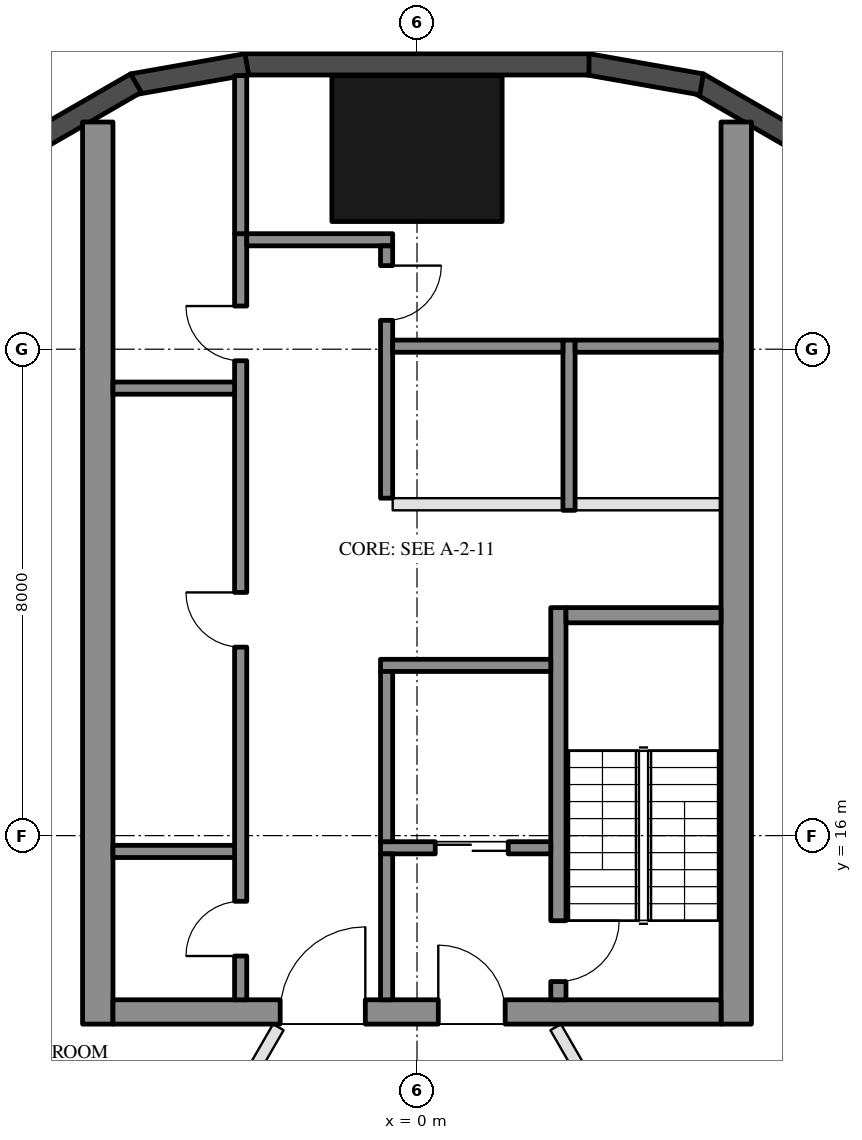
"""IFC4 building model, lengths in metres.
Left out: names, types, materials, properties, quantities, classifications, styles, units other than length and angle.
Written with IfcOpenShell. Run it as: python <this file> out.ifc"""

import sys

from ifc_helpers import new_model, si_unit, direction, frame, frame_2d, origin, origin_2d, place, context, subcontext, project, spatial, rectangle, hollow_rectangle, extrude, element, fill, save


model = new_model("IFC4")
c1 = context("Model", 3, precision=1e-05, world=origin(), true_north=direction((0.0, 1.0)))
c2 = subcontext(c1, "Body", "Model", "MODEL_VIEW")
j1 = project(units=[si_unit("LENGTHUNIT", "METRE"), si_unit("PLANEANGLEUNIT", "RADIAN")], contexts=[c1])
p1 = place(None, origin())
s1 = spatial("IfcSite", under=j1, at=p1, CompositionType="ELEMENT")
p2 = place(p1, origin())
s2 = spatial("IfcBuilding", under=s1, at=p2, CompositionType="ELEMENT")
p3 = place(p2, frame((0.0, 0.0, 53.9)))
s3 = spatial("IfcBuildingStorey", under=s2, at=p3, CompositionType="ELEMENT", Elevation=53.9)
p4 = place(p3, frame((0.0, 27.3, 0.0), z_axis=(0.0, 0.0, 1.0), x_axis=(1.0, 0.0, 0.0)))
e1 = element("IfcColumn", 1, at=p4, inside=s3, PredefinedType="COLUMN", context=c2, shape_type="SweptSolid", body=[
    extrude(hollow_rectangle(XDim=2.8, YDim=2.4, WallThickness=0.07, at=origin_2d()), origin(), (0.0, 0.0, 1.0), 3.7),
])
for number, where, z_axis, x_axis in (
    (2, (6.277, 27.422, 0.0), (0.0, 0.0, 1.0), (-0.866, 0.5, 0.0)),
    (3, (4.68, 28.356, 0.0), (0.0, 0.0, 1.0), (-0.985, 0.174, 0.0)),
):
    element("IfcWall", number, at=place(p3, frame(where, z_axis=z_axis, x_axis=x_axis)), inside=s3, PredefinedType="SOLIDWALL", context=c2, shape_type="SweptSolid", body=[
        extrude(rectangle(XDim=1.91, YDim=0.35, at=frame_2d((0.955, 0.0))), origin(), (0.0, 0.0, 1.0), 3.55),
    ])
p5 = place(p3, frame((2.829, 28.685, 0.0), z_axis=(0.0, 0.0, 1.0), x_axis=(-1.0, 0.0, 0.0)))
e4 = element("IfcWall", 4, at=p5, inside=s3, PredefinedType="SOLIDWALL", context=c2, shape_type="SweptSolid", body=[
    extrude(rectangle(XDim=5.658, YDim=0.35, at=frame_2d((2.829, 0.0))), origin(), (0.0, 0.0, 1.0), 3.55),
])
for number, where, z_axis, x_axis in (
    (5, (-2.799, 28.688, 0.0), (0.0, 0.0, 1.0), (-0.985, -0.174, 0.0)),
    (6, (-4.623, 28.377, 0.0), (0.0, 0.0, 1.0), (-0.866, -0.5, 0.0)),
):
    element("IfcWall", number, at=place(p3, frame(where, z_axis=z_axis, x_axis=x_axis)), inside=s3, PredefinedType="SOLIDWALL", context=c2, shape_type="SweptSolid", body=[
        extrude(rectangle(XDim=1.91, YDim=0.35, at=frame_2d((0.955, 0.0))), origin(), (0.0, 0.0, 1.0), 3.55),
    ])
for number, where, z_axis, x_axis in (
    (7, (5.25, 12.9, 0.0), (0.0, 0.0, 1.0), (0.0, 1.0, 0.0)),
    (8, (-5.25, 12.9, 0.0), (0.0, 0.0, 1.0), (0.0, 1.0, 0.0)),
):
    element("IfcWall", number, at=place(p3, frame(where, z_axis=z_axis, x_axis=x_axis)), inside=s3, PredefinedType="SHEAR", context=c2, shape_type="SweptSolid", body=[
        extrude(rectangle(XDim=14.837, YDim=0.5, at=frame_2d((7.418, 0.0))), origin(), (0.0, 0.0, 1.0), 3.5),
    ])
p6 = place(p3, frame((5.0, 13.1, 0.0), z_axis=(0.0, 0.0, 1.0), x_axis=(-1.0, 0.0, 0.0)))
e9 = element("IfcWall", 9, at=p6, inside=s3, PredefinedType="SHEAR", context=c2, shape_type="SweptSolid", body=[
    extrude(rectangle(XDim=10.0, YDim=0.4, at=frame_2d((5.0, 0.0))), origin(), (0.0, 0.0, 1.0), 3.5),
])
p7 = place(p6, frame((3.55, 0.0, 0.0)))
e10 = element("IfcOpeningElement", 10, at=p7, cuts=e9, PredefinedType="OPENING", context=c2, shape_type="SweptSolid", body=[
    extrude(rectangle(XDim=1.1, YDim=2.1, at=frame_2d((0.55, 1.05))), frame((0.0, 0.21, 0.0), z_axis=(0.0, -1.0, 0.0), x_axis=(1.0, 0.0, 0.0)), (0.0, 0.0, 1.0), 0.42),
])
p8 = place(p6, frame((5.85, 0.0, 0.0)))
e11 = element("IfcOpeningElement", 11, at=p8, cuts=e9, PredefinedType="OPENING", context=c2, shape_type="SweptSolid", body=[
    extrude(rectangle(XDim=1.4, YDim=2.1, at=frame_2d((0.7, 1.05))), frame((0.0, 0.21, 0.0), z_axis=(0.0, -1.0, 0.0), x_axis=(1.0, 0.0, 0.0)), (0.0, 0.0, 1.0), 0.42),
])
p9 = place(p3, frame((2.325, 13.3, 0.0), z_axis=(0.0, 0.0, 1.0), x_axis=(0.0, 1.0, 0.0)))
e12 = element("IfcWall", 12, at=p9, inside=s3, PredefinedType="SHEAR", context=c2, shape_type="SweptSolid", body=[
    extrude(rectangle(XDim=6.45, YDim=0.25, at=frame_2d((3.225, 0.0))), origin(), (0.0, 0.0, 1.0), 3.5),
])
p10 = place(p9, frame((0.3, 0.0, 0.0)))
e13 = element("IfcOpeningElement", 13, at=p10, cuts=e12, PredefinedType="OPENING", context=c2, shape_type="SweptSolid", body=[
    extrude(rectangle(XDim=1.0, YDim=2.1, at=frame_2d((0.5, 1.05))), frame((0.0, 0.135, 0.0), z_axis=(0.0, -1.0, 0.0), x_axis=(1.0, 0.0, 0.0)), (0.0, 0.0, 1.0), 0.27),
])
p11 = place(p3, frame((5.0, 19.625, 0.0), z_axis=(0.0, 0.0, 1.0), x_axis=(-1.0, 0.0, 0.0)))
e14 = element("IfcWall", 14, at=p11, inside=s3, PredefinedType="SHEAR", context=c2, shape_type="SweptSolid", body=[
    extrude(rectangle(XDim=2.55, YDim=0.25, at=frame_2d((1.275, 0.0))), origin(), (0.0, 0.0, 1.0), 3.5),
])
p12 = place(p3, frame((2.2, 18.8, 0.0), z_axis=(0.0, 0.0, 1.0), x_axis=(-1.0, 0.0, 0.0)))
e15 = element("IfcWall", 15, at=p12, inside=s3, PredefinedType="SHEAR", context=c2, shape_type="SweptSolid", body=[
    extrude(rectangle(XDim=2.8, YDim=0.2, at=frame_2d((1.4, 0.0))), origin(), (0.0, 0.0, 1.0), 3.5),
])
p13 = place(p3, frame((2.2, 15.8, 0.0), z_axis=(0.0, 0.0, 1.0), x_axis=(-1.0, 0.0, 0.0)))
e16 = element("IfcWall", 16, at=p13, inside=s3, PredefinedType="SHEAR", context=c2, shape_type="SweptSolid", body=[
    extrude(rectangle(XDim=2.8, YDim=0.2, at=frame_2d((1.4, 0.0))), origin(), (0.0, 0.0, 1.0), 3.5),
])
p14 = place(p13, frame((0.7, 0.0, 0.0)))
e17 = element("IfcOpeningElement", 17, at=p14, cuts=e16, PredefinedType="OPENING", context=c2, shape_type="SweptSolid", body=[
    extrude(rectangle(XDim=1.2, YDim=2.1, at=frame_2d((0.6, 1.05))), frame((0.0, 0.11, 0.0), z_axis=(0.0, -1.0, 0.0), x_axis=(1.0, 0.0, 0.0)), (0.0, 0.0, 1.0), 0.22),
])
p15 = place(p3, frame((-0.5, 15.9, 0.0), z_axis=(0.0, 0.0, 1.0), x_axis=(0.0, 1.0, 0.0)))
e18 = element("IfcWall", 18, at=p15, inside=s3, PredefinedType="SHEAR", context=c2, shape_type="SweptSolid", body=[
    extrude(rectangle(XDim=2.8, YDim=0.2, at=frame_2d((1.4, 0.0))), origin(), (0.0, 0.0, 1.0), 3.5),
])
p16 = place(p3, frame((-0.5, 13.3, 0.0), z_axis=(0.0, 0.0, 1.0), x_axis=(0.0, 1.0, 0.0)))
e19 = element("IfcWall", 19, at=p16, inside=s3, PredefinedType="SHEAR", context=c2, shape_type="SweptSolid", body=[
    extrude(rectangle(XDim=2.4, YDim=0.2, at=frame_2d((1.2, 0.0))), origin(), (0.0, 0.0, 1.0), 3.5),
])
p17 = place(p3, frame((-2.9, 13.3, 0.0), z_axis=(0.0, 0.0, 1.0), x_axis=(0.0, 1.0, 0.0)))
e20 = element("IfcWall", 20, at=p17, inside=s3, PredefinedType="SHEAR", context=c2, shape_type="SweptSolid", body=[
    extrude(rectangle(XDim=12.6, YDim=0.2, at=frame_2d((6.3, 0.0))), origin(), (0.0, 0.0, 1.0), 3.5),
])
p18 = place(p17, frame((0.72, 0.0, 0.0)))
e21 = element("IfcOpeningElement", 21, at=p18, cuts=e20, PredefinedType="OPENING", context=c2, shape_type="SweptSolid", body=[
    extrude(rectangle(XDim=0.9, YDim=2.1, at=frame_2d((0.45, 1.05))), frame((0.0, 0.11, 0.0), z_axis=(0.0, -1.0, 0.0), x_axis=(1.0, 0.0, 0.0)), (0.0, 0.0, 1.0), 0.22),
])
p19 = place(p17, frame((5.8, 0.0, 0.0)))
e22 = element("IfcOpeningElement", 22, at=p19, cuts=e20, PredefinedType="OPENING", context=c2, shape_type="SweptSolid", body=[
    extrude(rectangle(XDim=0.9, YDim=2.1, at=frame_2d((0.45, 1.05))), frame((0.0, 0.11, 0.0), z_axis=(0.0, -1.0, 0.0), x_axis=(1.0, 0.0, 0.0)), (0.0, 0.0, 1.0), 0.22),
])
p20 = place(p17, frame((10.51, 0.0, 0.0)))
e23 = element("IfcOpeningElement", 23, at=p20, cuts=e20, PredefinedType="OPENING", context=c2, shape_type="SweptSolid", body=[
    extrude(rectangle(XDim=0.9, YDim=2.1, at=frame_2d((0.45, 1.05))), frame((0.0, 0.11, 0.0), z_axis=(0.0, -1.0, 0.0), x_axis=(1.0, 0.0, 0.0)), (0.0, 0.0, 1.0), 0.22),
])
p21 = place(p3, frame((-0.4, 25.8, 0.0), z_axis=(0.0, 0.0, 1.0), x_axis=(-1.0, 0.0, 0.0)))
e24 = element("IfcWall", 24, at=p21, inside=s3, PredefinedType="SHEAR", context=c2, shape_type="SweptSolid", body=[
    extrude(rectangle(XDim=2.4, YDim=0.2, at=frame_2d((1.2, 0.0))), origin(), (0.0, 0.0, 1.0), 3.5),
])
p22 = place(p3, frame((-0.5, 21.55, 0.0), z_axis=(0.0, 0.0, 1.0), x_axis=(0.0, 1.0, 0.0)))
e25 = element("IfcWall", 25, at=p22, inside=s3, PredefinedType="SHEAR", context=c2, shape_type="SweptSolid", body=[
    extrude(rectangle(XDim=4.15, YDim=0.2, at=frame_2d((2.075, 0.0))), origin(), (0.0, 0.0, 1.0), 3.5),
])
p23 = place(p22, frame((2.925, 0.0, 0.0)))
e26 = element("IfcOpeningElement", 26, at=p23, cuts=e25, PredefinedType="OPENING", context=c2, shape_type="SweptSolid", body=[
    extrude(rectangle(XDim=0.9, YDim=2.1, at=frame_2d((0.45, 1.05))), frame((0.0, 0.11, 0.0), z_axis=(0.0, -1.0, 0.0), x_axis=(1.0, 0.0, 0.0)), (0.0, 0.0, 1.0), 0.22),
])
for number, where, z_axis, x_axis in (
    (27, (-3.0, 15.74, 0.0), (0.0, 0.0, 1.0), (-1.0, 0.0, 0.0)),
    (28, (-3.0, 23.36, 0.0), (0.0, 0.0, 1.0), (-1.0, 0.0, 0.0)),
):
    element("IfcWall", number, at=place(p3, frame(where, z_axis=z_axis, x_axis=x_axis)), inside=s3, PredefinedType="SHEAR", context=c2, shape_type="SweptSolid", body=[
        extrude(rectangle(XDim=2.0, YDim=0.2, at=frame_2d((1.0, 0.0))), origin(), (0.0, 0.0, 1.0), 3.5),
    ])
p24 = place(p3, frame((-2.9, 25.9, 0.0), z_axis=(0.0, 0.0, 1.0), x_axis=(0.0, 1.0, 0.0)))
e29 = element("IfcWall", 29, at=p24, inside=s3, PredefinedType="SHEAR", context=c2, shape_type="SweptSolid", body=[
    extrude(rectangle(XDim=2.6, YDim=0.2, at=frame_2d((1.3, 0.0))), origin(), (0.0, 0.0, 1.0), 3.5),
])
p25 = place(p3, frame((2.5, 21.35, 0.0), z_axis=(0.0, 0.0, 1.0), x_axis=(0.0, 1.0, 0.0)))
e30 = element("IfcWall", 30, at=p25, inside=s3, PredefinedType="SHEAR", context=c2, shape_type="SweptSolid", body=[
    extrude(rectangle(XDim=2.8, YDim=0.2, at=frame_2d((1.4, 0.0))), origin(), (0.0, 0.0, 1.0), 3.5),
])
p26 = place(p3, frame((5.0, 24.05, 0.0), z_axis=(0.0, 0.0, 1.0), x_axis=(-1.0, 0.0, 0.0)))
e31 = element("IfcWall", 31, at=p26, inside=s3, PredefinedType="SHEAR", context=c2, shape_type="SweptSolid", body=[
    extrude(rectangle(XDim=2.4, YDim=0.2, at=frame_2d((1.2, 0.0))), origin(), (0.0, 0.0, 1.0), 3.5),
])
p27 = place(p3, frame((2.4, 24.05, 0.0), z_axis=(0.0, 0.0, 1.0), x_axis=(-1.0, 0.0, 0.0)))
e32 = element("IfcWall", 32, at=p27, inside=s3, PredefinedType="SHEAR", context=c2, shape_type="SweptSolid", body=[
    extrude(rectangle(XDim=2.8, YDim=0.2, at=frame_2d((1.4, 0.0))), origin(), (0.0, 0.0, 1.0), 3.5),
])
p28 = place(p3, frame((5.0, 21.45, 0.0), z_axis=(0.0, 0.0, 1.0), x_axis=(-1.0, 0.0, 0.0)))
e33 = element("IfcWall", 33, at=p28, inside=s3, PredefinedType="PARTITIONING", context=c2, shape_type="SweptSolid", body=[
    extrude(rectangle(XDim=2.4, YDim=0.2, at=frame_2d((1.2, 0.0))), origin(), (0.0, 0.0, 1.0), 3.5),
])
p29 = place(p3, frame((2.4, 21.45, 0.0), z_axis=(0.0, 0.0, 1.0), x_axis=(-1.0, 0.0, 0.0)))
e34 = element("IfcWall", 34, at=p29, inside=s3, PredefinedType="PARTITIONING", context=c2, shape_type="SweptSolid", body=[
    extrude(rectangle(XDim=2.8, YDim=0.2, at=frame_2d((1.4, 0.0))), origin(), (0.0, 0.0, 1.0), 3.5),
])
p30 = place(p3, frame((-13.936, 12.622, 0.0), z_axis=(0.0, 0.0, 1.0), x_axis=(0.872898889426, -0.487901146585, 0.0)))
e35 = element("IfcWall", 35, at=p30, inside=s3, PredefinedType="PARTITIONING", context=c2, shape_type="SweptSolid", body=[
    extrude(rectangle(XDim=10.081, YDim=0.2, at=frame_2d((5.041, 0.0))), origin(), (0.0, 0.0, 1.0), 2.95),
])
p31 = place(p3, frame((2.281, 12.85, 0.0), z_axis=(0.0, 0.0, 1.0), x_axis=(0.499997198377, -0.866027021296, 0.0)))
e36 = element("IfcWall", 36, at=p31, inside=s3, PredefinedType="PARTITIONING", context=c2, shape_type="SweptSolid", body=[
    extrude(rectangle(XDim=8.487, YDim=0.2, at=frame_2d((4.243, 0.0))), origin(), (0.0, 0.0, 1.0), 2.95),
])
p32 = place(p31, frame((3.743, 0.0, 0.0)))
e37 = element("IfcOpeningElement", 37, at=p32, cuts=e36, PredefinedType="OPENING", context=c2, shape_type="SweptSolid", body=[
    extrude(rectangle(XDim=1.0, YDim=2.1, at=frame_2d((0.5, 1.05))), frame((0.0, 0.11, 0.0), z_axis=(0.0, -1.0, 0.0), x_axis=(1.0, 0.0, 0.0)), (0.0, 0.0, 1.0), 0.22),
])
p33 = place(p3, frame((-5.174, 7.838, 0.0), z_axis=(0.0, 0.0, 1.0), x_axis=(0.499973220989, 0.866040864101, 0.0)))
e38 = element("IfcWall", 38, at=p33, inside=s3, PredefinedType="PARTITIONING", context=c2, shape_type="SweptSolid", body=[
    extrude(rectangle(XDim=5.787, YDim=0.2, at=frame_2d((2.894, 0.0))), origin(), (0.0, 0.0, 1.0), 2.95),
])
p34 = place(p33, frame((2.393, 0.0, 0.0)))
e39 = element("IfcOpeningElement", 39, at=p34, cuts=e38, PredefinedType="OPENING", context=c2, shape_type="SweptSolid", body=[
    extrude(rectangle(XDim=1.0, YDim=2.1, at=frame_2d((0.5, 1.05))), frame((0.0, 0.11, 0.0), z_axis=(0.0, -1.0, 0.0), x_axis=(1.0, 0.0, 0.0)), (0.0, 0.0, 1.0), 0.22),
])
p35 = place(p14, origin())
e40 = element("IfcDoor", 40, at=p35, inside=s3, OperationType="DOUBLE_DOOR_SLIDING", PredefinedType="DOOR", context=c2, shape_type="SweptSolid", body=[
    extrude(rectangle(XDim=1.2, YDim=2.1, at=frame_2d((0.6, 1.05))), frame((0.0, 0.025, 0.0), z_axis=(0.0, -1.0, 0.0), x_axis=(1.0, 0.0, 0.0)), (0.0, 0.0, 1.0), 0.05),
])
fill(e17, e40)
p36 = place(p18, origin())
e41 = element("IfcDoor", 41, at=p36, inside=s3, OperationType="SINGLE_SWING_LEFT", PredefinedType="DOOR", context=c2, shape_type="SweptSolid", body=[
    extrude(rectangle(XDim=0.9, YDim=2.1, at=frame_2d((0.45, 1.05))), frame((0.0, 0.025, 0.0), z_axis=(0.0, -1.0, 0.0), x_axis=(1.0, 0.0, 0.0)), (0.0, 0.0, 1.0), 0.05),
])
fill(e21, e41)
p37 = place(p19, origin())
e42 = element("IfcDoor", 42, at=p37, inside=s3, OperationType="SINGLE_SWING_RIGHT", PredefinedType="DOOR", context=c2, shape_type="SweptSolid", body=[
    extrude(rectangle(XDim=0.9, YDim=2.1, at=frame_2d((0.45, 1.05))), frame((0.0, 0.025, 0.0), z_axis=(0.0, -1.0, 0.0), x_axis=(1.0, 0.0, 0.0)), (0.0, 0.0, 1.0), 0.05),
])
fill(e22, e42)
p38 = place(p20, origin())
e43 = element("IfcDoor", 43, at=p38, inside=s3, OperationType="SINGLE_SWING_RIGHT", PredefinedType="DOOR", context=c2, shape_type="SweptSolid", body=[
    extrude(rectangle(XDim=0.9, YDim=2.1, at=frame_2d((0.45, 1.05))), frame((0.0, 0.025, 0.0), z_axis=(0.0, -1.0, 0.0), x_axis=(1.0, 0.0, 0.0)), (0.0, 0.0, 1.0), 0.05),
])
fill(e23, e43)
p39 = place(p23, frame((0.9, 0.0, 0.0), z_axis=(0.0, 0.0, 1.0), x_axis=(-1.0, 0.0, 0.0)))
e44 = element("IfcDoor", 44, at=p39, inside=s3, OperationType="SINGLE_SWING_LEFT", PredefinedType="DOOR", context=c2, shape_type="SweptSolid", body=[
    extrude(rectangle(XDim=0.9, YDim=2.1, at=frame_2d((0.45, 1.05))), frame((0.0, 0.025, 0.0), z_axis=(0.0, -1.0, 0.0), x_axis=(1.0, 0.0, 0.0)), (0.0, 0.0, 1.0), 0.05),
])
fill(e26, e44)
p40 = place(p7, frame((1.1, 0.0, 0.0), z_axis=(0.0, 0.0, 1.0), x_axis=(-1.0, 0.0, 0.0)))
e45 = element("IfcDoor", 45, at=p40, inside=s3, OperationType="SINGLE_SWING_LEFT", PredefinedType="DOOR", context=c2, shape_type="SweptSolid", body=[
    extrude(rectangle(XDim=1.1, YDim=2.1, at=frame_2d((0.55, 1.05))), frame((0.0, 0.025, 0.0), z_axis=(0.0, -1.0, 0.0), x_axis=(1.0, 0.0, 0.0)), (0.0, 0.0, 1.0), 0.05),
])
fill(e10, e45)
p41 = place(p8, frame((1.4, 0.0, 0.0), z_axis=(0.0, 0.0, 1.0), x_axis=(-1.0, 0.0, 0.0)))
e46 = element("IfcDoor", 46, at=p41, inside=s3, OperationType="DOUBLE_DOOR_SINGLE_SWING", PredefinedType="DOOR", context=c2, shape_type="SweptSolid", body=[
    extrude(rectangle(XDim=1.4, YDim=2.1, at=frame_2d((0.7, 1.05))), frame((0.0, 0.025, 0.0), z_axis=(0.0, -1.0, 0.0), x_axis=(1.0, 0.0, 0.0)), (0.0, 0.0, 1.0), 0.05),
])
fill(e11, e46)
p42 = place(p10, frame((1.0, 0.0, 0.0), z_axis=(0.0, 0.0, 1.0), x_axis=(-1.0, 0.0, 0.0)))
e47 = element("IfcDoor", 47, at=p42, inside=s3, OperationType="SINGLE_SWING_LEFT", PredefinedType="DOOR", context=c2, shape_type="SweptSolid", body=[
    extrude(rectangle(XDim=1.0, YDim=2.1, at=frame_2d((0.5, 1.05))), frame((0.0, 0.025, 0.0), z_axis=(0.0, -1.0, 0.0), x_axis=(1.0, 0.0, 0.0)), (0.0, 0.0, 1.0), 0.05),
])
fill(e13, e47)
save(model, sys.argv[1])
